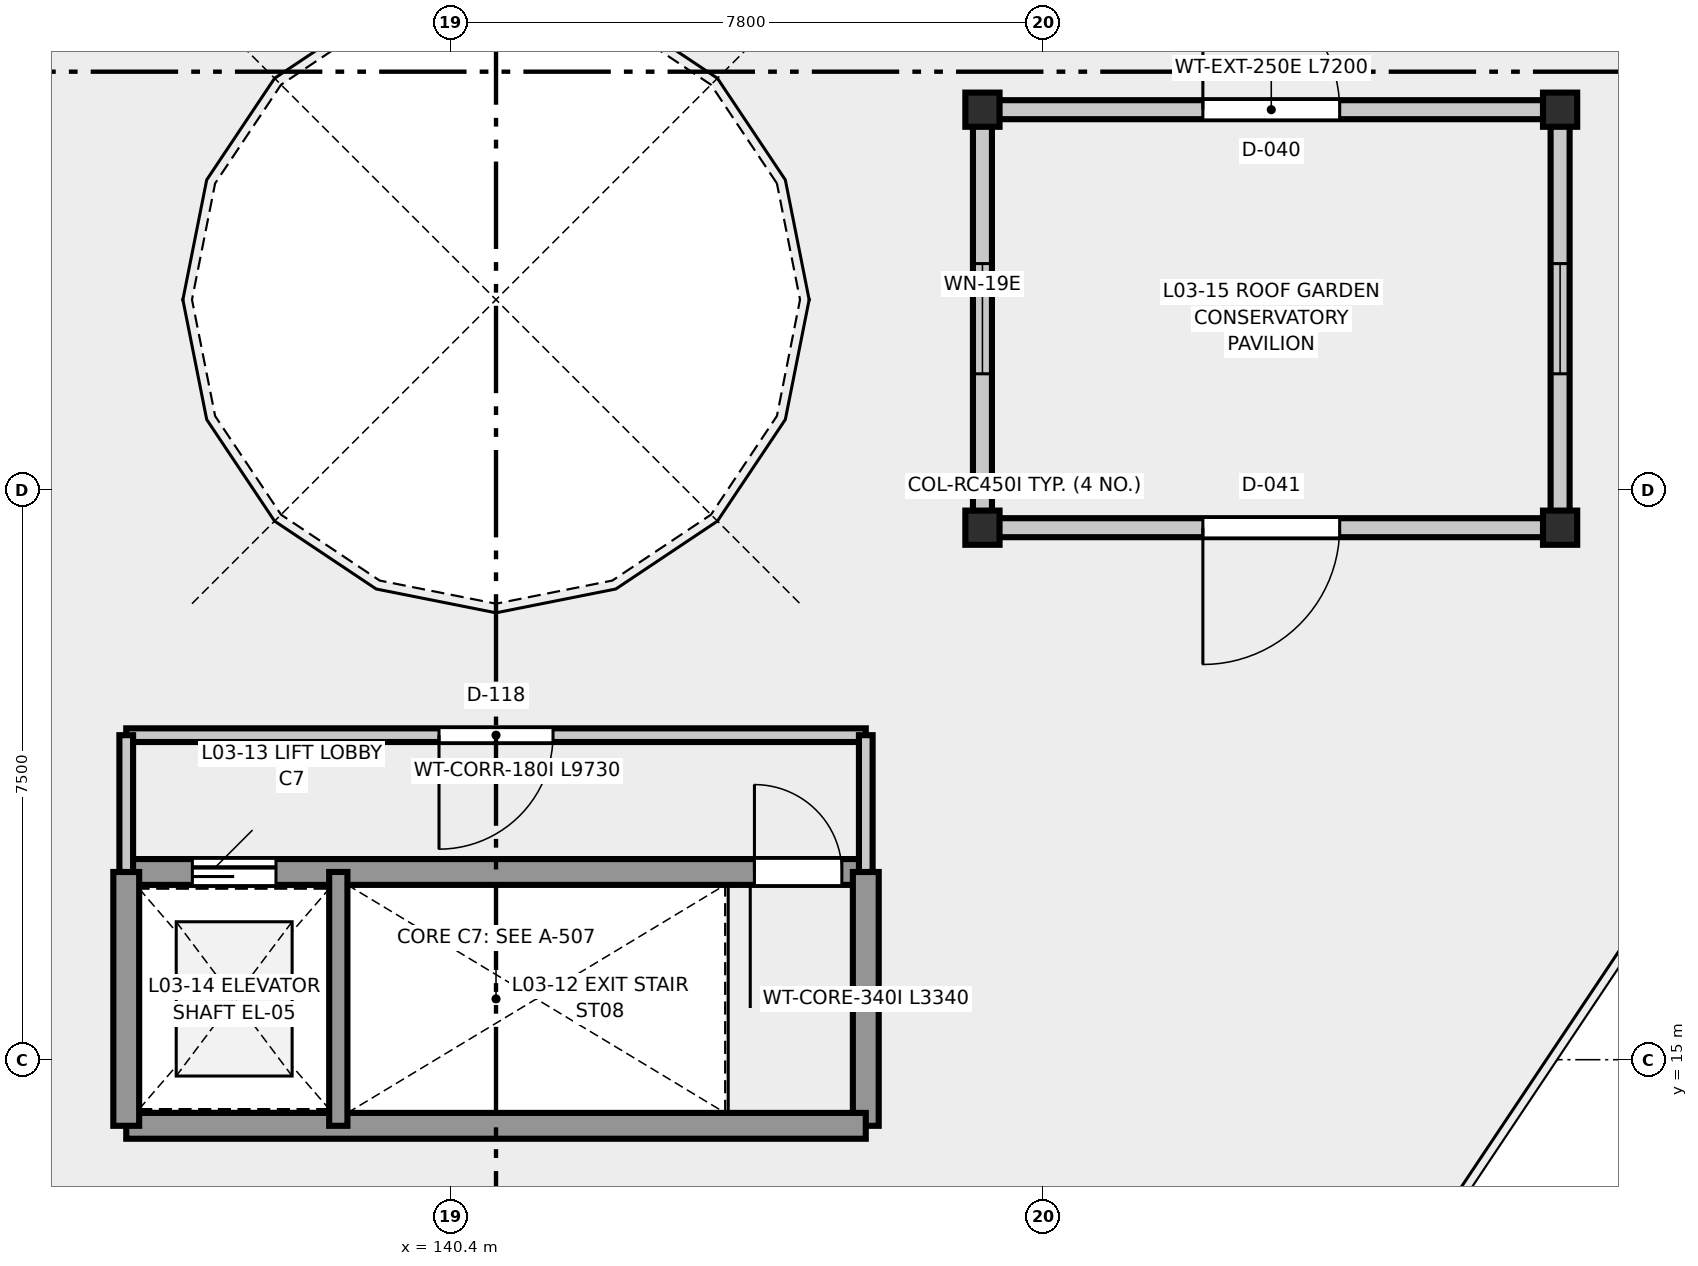
"""IFC4 building model, lengths in metres.
Left out: names, types, materials, properties, quantities, classifications, styles, units other than length and angle.
Written with IfcOpenShell. Run it as: python <this file> out.ifc"""

import sys

from ifc_helpers import new_model, si_unit, direction, frame, frame_2d, origin, origin_2d, place, context, subcontext, project, spatial, rectangle, extrude, element, fill, save


model = new_model("IFC4")
c1 = context("Model", 3, precision=1e-05, world=origin(), true_north=direction((0.0, 1.0)))
c2 = subcontext(c1, "Body", "Model", "MODEL_VIEW")
j1 = project(units=[si_unit("LENGTHUNIT", "METRE"), si_unit("PLANEANGLEUNIT", "RADIAN")], contexts=[c1])
p1 = place(None, origin())
s1 = spatial("IfcSite", under=j1, at=p1, CompositionType="ELEMENT")
p2 = place(p1, origin())
s2 = spatial("IfcBuilding", under=s1, at=p2, CompositionType="ELEMENT")
p3 = place(p2, frame((0.0, 0.0, 12.6)))
s3 = spatial("IfcBuildingStorey", under=s2, at=p3, CompositionType="ELEMENT", Elevation=12.6)
for number, where, z_axis, x_axis in (
    (1, (147.4, 22.0, 0.0), (0.0, 0.0, 1.0), (1.0, 0.0, 0.0)),
    (2, (155.0, 22.0, 0.0), (0.0, 0.0, 1.0), (1.0, 0.0, 0.0)),
    (3, (155.0, 27.5, 0.0), (0.0, 0.0, 1.0), (1.0, 0.0, 0.0)),
    (4, (147.4, 27.5, 0.0), (0.0, 0.0, 1.0), (1.0, 0.0, 0.0)),
):
    element("IfcColumn", number, at=place(p3, frame(where, z_axis=z_axis, x_axis=x_axis)), inside=s3, PredefinedType="COLUMN", context=c2, shape_type="SweptSolid", body=[
        extrude(rectangle(XDim=0.45, YDim=0.45, at=origin_2d()), origin(), (0.0, 0.0, 1.0), 3.9),
    ])
p4 = place(p3, frame((147.4, 22.2, 0.0), z_axis=(0.0, 0.0, 1.0), x_axis=(0.0, 1.0, 0.0)))
e5 = element("IfcWall", 5, at=p4, inside=s3, PredefinedType="STANDARD", context=c2, shape_type="SweptSolid", body=[
    extrude(rectangle(XDim=5.1, YDim=0.25, at=frame_2d((2.55, 0.0))), origin(), (0.0, 0.0, 1.0), 3.05),
])
p5 = place(p4, frame((1.825, 0.0, 0.8)))
e6 = element("IfcOpeningElement", 6, at=p5, cuts=e5, PredefinedType="OPENING", context=c2, shape_type="SweptSolid", body=[
    extrude(rectangle(XDim=1.45, YDim=1.75, at=frame_2d((0.725, 0.875))), frame((0.0, 0.135, 0.0), z_axis=(0.0, -1.0, 0.0), x_axis=(1.0, 0.0, 0.0)), (0.0, 0.0, 1.0), 0.27),
])
p6 = place(p3, frame((147.6, 27.5, 0.0), z_axis=(0.0, 0.0, 1.0), x_axis=(1.0, 0.0, 0.0)))
e7 = element("IfcWall", 7, at=p6, inside=s3, PredefinedType="STANDARD", context=c2, shape_type="SweptSolid", body=[
    extrude(rectangle(XDim=7.2, YDim=0.25, at=frame_2d((3.6, 0.0))), origin(), (0.0, 0.0, 1.0), 3.05),
])
p7 = place(p6, frame((2.7, 0.0, 0.0)))
e8 = element("IfcOpeningElement", 8, at=p7, cuts=e7, PredefinedType="OPENING", context=c2, shape_type="SweptSolid", body=[
    extrude(rectangle(XDim=1.8, YDim=2.25, at=frame_2d((0.9, 1.125))), frame((0.0, 0.135, 0.0), z_axis=(0.0, -1.0, 0.0), x_axis=(1.0, 0.0, 0.0)), (0.0, 0.0, 1.0), 0.27),
])
p8 = place(p3, frame((155.0, 27.3, 0.0), z_axis=(0.0, 0.0, 1.0), x_axis=(0.0, -1.0, 0.0)))
e9 = element("IfcWall", 9, at=p8, inside=s3, PredefinedType="STANDARD", context=c2, shape_type="SweptSolid", body=[
    extrude(rectangle(XDim=5.1, YDim=0.25, at=frame_2d((2.55, 0.0))), origin(), (0.0, 0.0, 1.0), 3.05),
])
p9 = place(p8, frame((1.825, 0.0, 0.8)))
e10 = element("IfcOpeningElement", 10, at=p9, cuts=e9, PredefinedType="OPENING", context=c2, shape_type="SweptSolid", body=[
    extrude(rectangle(XDim=1.45, YDim=1.75, at=frame_2d((0.725, 0.875))), frame((0.0, 0.135, 0.0), z_axis=(0.0, -1.0, 0.0), x_axis=(1.0, 0.0, 0.0)), (0.0, 0.0, 1.0), 0.27),
])
p10 = place(p3, frame((154.8, 22.0, 0.0), z_axis=(0.0, 0.0, 1.0), x_axis=(-1.0, 0.0, 0.0)))
e11 = element("IfcWall", 11, at=p10, inside=s3, PredefinedType="STANDARD", context=c2, shape_type="SweptSolid", body=[
    extrude(rectangle(XDim=7.2, YDim=0.25, at=frame_2d((3.6, 0.0))), origin(), (0.0, 0.0, 1.0), 3.05),
])
p11 = place(p10, frame((2.7, 0.0, 0.0)))
e12 = element("IfcOpeningElement", 12, at=p11, cuts=e11, PredefinedType="OPENING", context=c2, shape_type="SweptSolid", body=[
    extrude(rectangle(XDim=1.8, YDim=2.25, at=frame_2d((0.9, 1.125))), frame((0.0, 0.135, 0.0), z_axis=(0.0, -1.0, 0.0), x_axis=(1.0, 0.0, 0.0)), (0.0, 0.0, 1.0), 0.27),
])
p12 = place(p3, frame((136.135, 17.47, 0.0), z_axis=(0.0, 0.0, 1.0), x_axis=(1.0, 0.0, 0.0)))
e13 = element("IfcWall", 13, at=p12, inside=s3, PredefinedType="SHEAR", context=c2, shape_type="SweptSolid", body=[
    extrude(rectangle(XDim=9.73, YDim=0.34, at=frame_2d((4.865, 0.0))), origin(), (0.0, 0.0, 1.0), 3.9),
])
p13 = place(p12, frame((8.265, 0.0, 0.0)))
e14 = element("IfcOpeningElement", 14, at=p13, cuts=e13, PredefinedType="OPENING", context=c2, shape_type="SweptSolid", body=[
    extrude(rectangle(XDim=1.15, YDim=2.15, at=frame_2d((0.575, 1.075))), frame((0.0, 0.18, 0.0), z_axis=(0.0, -1.0, 0.0), x_axis=(1.0, 0.0, 0.0)), (0.0, 0.0, 1.0), 0.36),
])
p14 = place(p12, frame((0.87, 0.0, 0.0)))
e15 = element("IfcOpeningElement", 15, at=p14, cuts=e13, PredefinedType="OPENING", context=c2, shape_type="SweptSolid", body=[
    extrude(rectangle(XDim=1.1, YDim=2.15, at=frame_2d((0.55, 1.075))), frame((0.0, 0.18, 0.0), z_axis=(0.0, -1.0, 0.0), x_axis=(1.0, 0.0, 0.0)), (0.0, 0.0, 1.0), 0.36),
])
p15 = place(p3, frame((145.865, 17.47, 0.0), z_axis=(0.0, 0.0, 1.0), x_axis=(0.0, -1.0, 0.0)))
e16 = element("IfcWall", 16, at=p15, inside=s3, PredefinedType="SHEAR", context=c2, shape_type="SweptSolid", body=[
    extrude(rectangle(XDim=3.34, YDim=0.34, at=frame_2d((1.67, 0.0))), origin(), (0.0, 0.0, 1.0), 3.9),
])
p16 = place(p3, frame((145.865, 14.13, 0.0), z_axis=(0.0, 0.0, 1.0), x_axis=(-1.0, 0.0, 0.0)))
e17 = element("IfcWall", 17, at=p16, inside=s3, PredefinedType="SHEAR", context=c2, shape_type="SweptSolid", body=[
    extrude(rectangle(XDim=9.73, YDim=0.34, at=frame_2d((4.865, 0.0))), origin(), (0.0, 0.0, 1.0), 3.9),
])
p17 = place(p3, frame((136.135, 14.13, 0.0), z_axis=(0.0, 0.0, 1.0), x_axis=(0.0, 1.0, 0.0)))
e18 = element("IfcWall", 18, at=p17, inside=s3, PredefinedType="SHEAR", context=c2, shape_type="SweptSolid", body=[
    extrude(rectangle(XDim=3.34, YDim=0.34, at=frame_2d((1.67, 0.0))), origin(), (0.0, 0.0, 1.0), 3.9),
])
p18 = place(p3, frame((138.925, 17.47, 0.0), z_axis=(0.0, 0.0, 1.0), x_axis=(0.0, -1.0, 0.0)))
e19 = element("IfcWall", 19, at=p18, inside=s3, PredefinedType="SHEAR", context=c2, shape_type="SweptSolid", body=[
    extrude(rectangle(XDim=3.34, YDim=0.24, at=frame_2d((1.67, 0.0))), origin(), (0.0, 0.0, 1.0), 3.9),
])
p19 = place(p3, frame((145.865, 19.27, 0.0), z_axis=(0.0, 0.0, 1.0), x_axis=(-1.0, 0.0, 0.0)))
e20 = element("IfcWall", 20, at=p19, inside=s3, PredefinedType="PARTITIONING", context=c2, shape_type="SweptSolid", body=[
    extrude(rectangle(XDim=9.73, YDim=0.18, at=frame_2d((4.865, 0.0))), origin(), (0.0, 0.0, 1.0), 3.595),
])
p20 = place(p19, frame((4.115, 0.0, 0.0)))
e21 = element("IfcOpeningElement", 21, at=p20, cuts=e20, PredefinedType="OPENING", context=c2, shape_type="SweptSolid", body=[
    extrude(rectangle(XDim=1.5, YDim=2.15, at=frame_2d((0.75, 1.075))), frame((0.0, 0.1, 0.0), z_axis=(0.0, -1.0, 0.0), x_axis=(1.0, 0.0, 0.0)), (0.0, 0.0, 1.0), 0.2),
])
for number, where, z_axis, x_axis in (
    (22, (145.865, 17.47, 0.0), (0.0, 0.0, 1.0), (0.0, 1.0, 0.0)),
    (23, (136.135, 17.47, 0.0), (0.0, 0.0, 1.0), (0.0, 1.0, 0.0)),
):
    element("IfcWall", number, at=place(p3, frame(where, z_axis=z_axis, x_axis=x_axis)), inside=s3, PredefinedType="PARTITIONING", context=c2, shape_type="SweptSolid", body=[
        extrude(rectangle(XDim=1.8, YDim=0.18, at=frame_2d((0.9, 0.0))), origin(), (0.0, 0.0, 1.0), 3.595),
    ])
p21 = place(p5, origin())
e24 = element("IfcWindow", 24, at=p21, inside=s3, PartitioningType="SINGLE_PANEL", PredefinedType="WINDOW", context=c2, shape_type="SweptSolid", body=[
    extrude(rectangle(XDim=1.45, YDim=1.75, at=frame_2d((0.725, 0.875))), frame((0.0, 0.03, 0.0), z_axis=(0.0, -1.0, 0.0), x_axis=(1.0, 0.0, 0.0)), (0.0, 0.0, 1.0), 0.06),
])
fill(e6, e24)
p22 = place(p7, origin())
e25 = element("IfcDoor", 25, at=p22, inside=s3, OperationType="SINGLE_SWING_LEFT", PredefinedType="DOOR", context=c2, shape_type="SweptSolid", body=[
    extrude(rectangle(XDim=1.8, YDim=2.25, at=frame_2d((0.9, 1.125))), frame((0.0, 0.025, 0.0), z_axis=(0.0, -1.0, 0.0), x_axis=(1.0, 0.0, 0.0)), (0.0, 0.0, 1.0), 0.05),
])
fill(e8, e25)
p23 = place(p9, origin())
e26 = element("IfcWindow", 26, at=p23, inside=s3, PartitioningType="SINGLE_PANEL", PredefinedType="WINDOW", context=c2, shape_type="SweptSolid", body=[
    extrude(rectangle(XDim=1.45, YDim=1.75, at=frame_2d((0.725, 0.875))), frame((0.0, 0.03, 0.0), z_axis=(0.0, -1.0, 0.0), x_axis=(1.0, 0.0, 0.0)), (0.0, 0.0, 1.0), 0.06),
])
fill(e10, e26)
p24 = place(p11, origin())
e27 = element("IfcDoor", 27, at=p24, inside=s3, OperationType="SINGLE_SWING_RIGHT", PredefinedType="DOOR", context=c2, shape_type="SweptSolid", body=[
    extrude(rectangle(XDim=1.8, YDim=2.25, at=frame_2d((0.9, 1.125))), frame((0.0, 0.025, 0.0), z_axis=(0.0, -1.0, 0.0), x_axis=(1.0, 0.0, 0.0)), (0.0, 0.0, 1.0), 0.05),
])
fill(e12, e27)
p25 = place(p13, origin())
e28 = element("IfcDoor", 28, at=p25, inside=s3, OperationType="SINGLE_SWING_LEFT", PredefinedType="DOOR", context=c2, shape_type="SweptSolid", body=[
    extrude(rectangle(XDim=1.15, YDim=2.15, at=frame_2d((0.575, 1.075))), frame((0.0, 0.025, 0.0), z_axis=(0.0, -1.0, 0.0), x_axis=(1.0, 0.0, 0.0)), (0.0, 0.0, 1.0), 0.05),
])
fill(e14, e28)
p26 = place(p14, origin())
e29 = element("IfcDoor", 29, at=p26, inside=s3, OperationType="SLIDING_TO_LEFT", PredefinedType="DOOR", context=c2, shape_type="SweptSolid", body=[
    extrude(rectangle(XDim=1.1, YDim=2.15, at=frame_2d((0.55, 1.075))), frame((0.0, 0.025, 0.0), z_axis=(0.0, -1.0, 0.0), x_axis=(1.0, 0.0, 0.0)), (0.0, 0.0, 1.0), 0.05),
])
fill(e15, e29)
p27 = place(p20, origin())
e30 = element("IfcDoor", 30, at=p27, inside=s3, OperationType="SINGLE_SWING_RIGHT", PredefinedType="DOOR", context=c2, shape_type="SweptSolid", body=[
    extrude(rectangle(XDim=1.5, YDim=2.15, at=frame_2d((0.75, 1.075))), frame((0.0, 0.025, 0.0), z_axis=(0.0, -1.0, 0.0), x_axis=(1.0, 0.0, 0.0)), (0.0, 0.0, 1.0), 0.05),
])
fill(e21, e30)
save(model, sys.argv[1])
